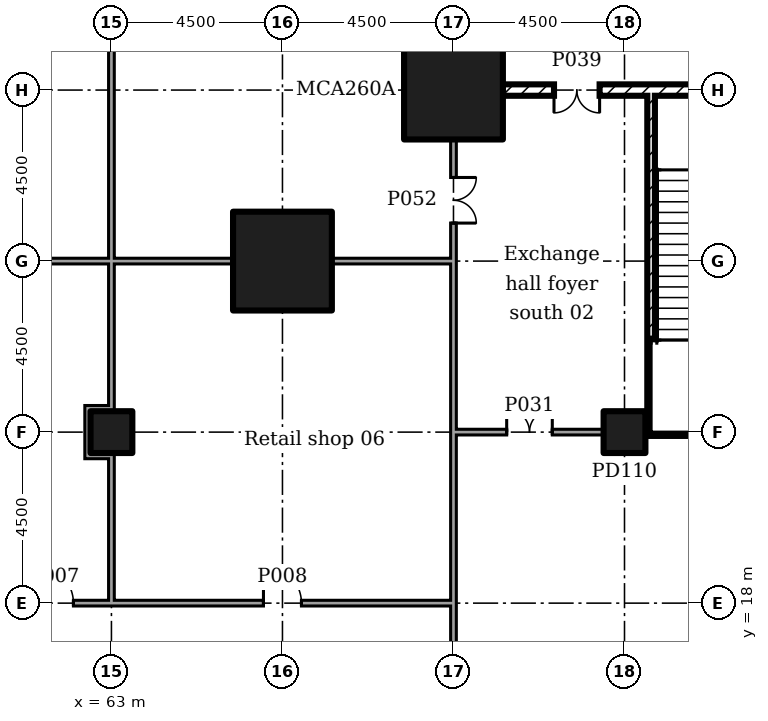
"""IFC4 building model, lengths in metres.
Left out: names, types, materials, properties, quantities, classifications, styles, units other than length and angle.
Written with IfcOpenShell. Run it as: python <this file> out.ifc"""

import sys

from ifc_helpers import new_model, si_unit, direction, frame, frame_2d, origin, origin_2d, place, context, subcontext, project, spatial, rectangle, extrude, element, fill, save


model = new_model("IFC4")
c1 = context("Model", 3, precision=1e-05, world=origin(), true_north=direction((0.0, 1.0)))
c2 = subcontext(c1, "Body", "Model", "MODEL_VIEW")
j1 = project(units=[si_unit("LENGTHUNIT", "METRE"), si_unit("PLANEANGLEUNIT", "RADIAN")], contexts=[c1])
p1 = place(None, origin())
s1 = spatial("IfcSite", under=j1, at=p1, CompositionType="ELEMENT")
p2 = place(p1, origin())
s2 = spatial("IfcBuilding", under=s1, at=p2, CompositionType="ELEMENT")
p3 = place(p2, frame((0.0, 0.0, 6.0)))
s3 = spatial("IfcBuildingStorey", under=s2, at=p3, CompositionType="ELEMENT", Elevation=6.0)
for number, where in (
    (1, (67.5, 27.0, 0.0)),
    (2, (72.0, 31.5, 0.0)),
):
    element("IfcColumn", number, at=place(p3, frame(where)), inside=s3, PredefinedType="COLUMN", context=c2, shape_type="SweptSolid", body=[
        extrude(rectangle(XDim=2.6, YDim=2.6, at=origin_2d()), origin(), (0.0, 0.0, 1.0), 5.5),
    ])
for number, where in (
    (3, (63.0, 22.5, 0.0)),
    (4, (76.5, 22.5, 0.0)),
):
    element("IfcColumn", number, at=place(p3, frame(where)), inside=s3, PredefinedType="COLUMN", context=c2, shape_type="SweptSolid", body=[
        extrude(rectangle(XDim=1.1, YDim=1.1, at=origin_2d()), origin(), (0.0, 0.0, 1.0), 5.5),
    ])
p4 = place(p3, frame((72.0, 9.3, 0.0), z_axis=(0.0, 0.0, 1.0), x_axis=(0.0, 1.0, 0.0)))
e5 = element("IfcWall", 5, at=p4, inside=s3, PredefinedType="PARTITIONING", context=c2, shape_type="SweptSolid", body=[
    extrude(rectangle(XDim=8.775, YDim=0.15, at=frame_2d((4.387, 0.0))), origin(), (0.0, 0.0, 1.0), 5.05),
])
p5 = place(p4, frame((3.45, 0.0, 0.0)))
e6 = element("IfcOpeningElement", 6, at=p5, cuts=e5, PredefinedType="OPENING", context=c2, shape_type="SweptSolid", body=[
    extrude(rectangle(XDim=1.8, YDim=2.1, at=frame_2d((0.9, 1.05))), frame((0.0, 0.085, 0.0), z_axis=(0.0, -1.0, 0.0), x_axis=(1.0, 0.0, 0.0)), (0.0, 0.0, 1.0), 0.17),
])
p6 = place(p3, frame((72.0, 18.0, 0.0), z_axis=(0.0, 0.0, 1.0), x_axis=(0.0, 1.0, 0.0)))
e7 = element("IfcWall", 7, at=p6, inside=s3, PredefinedType="PARTITIONING", context=c2, shape_type="SweptSolid", body=[
    extrude(rectangle(XDim=4.575, YDim=0.15, at=frame_2d((2.288, 0.0))), origin(), (0.0, 0.0, 1.0), 5.05),
])
p7 = place(p3, frame((72.075, 22.5, 0.0)))
e8 = element("IfcWall", 8, at=p7, inside=s3, PredefinedType="PARTITIONING", context=c2, shape_type="SweptSolid", body=[
    extrude(rectangle(XDim=3.88, YDim=0.15, at=frame_2d((1.94, 0.0))), origin(), (0.0, 0.0, 1.0), 5.05),
])
p8 = place(p7, frame((1.325, 0.0, 0.0)))
e9 = element("IfcOpeningElement", 9, at=p8, cuts=e8, PredefinedType="OPENING", context=c2, shape_type="SweptSolid", body=[
    extrude(rectangle(XDim=1.2, YDim=2.1, at=frame_2d((0.6, 1.05))), frame((0.0, 0.085, 0.0), z_axis=(0.0, -1.0, 0.0), x_axis=(1.0, 0.0, 0.0)), (0.0, 0.0, 1.0), 0.17),
])
p9 = place(p3, frame((77.1, 22.5, 0.0)))
e10 = element("IfcWall", 10, at=p9, inside=s3, PredefinedType="SOLIDWALL", context=c2, shape_type="SweptSolid", body=[
    extrude(rectangle(XDim=4.6, YDim=0.2, at=frame_2d((2.3, 0.0))), origin(), (0.0, 0.0, 1.0), 5.05),
])
p10 = place(p3, frame((73.295, 31.5, 0.0)))
e11 = element("IfcWall", 11, at=p10, inside=s3, PredefinedType="SOLIDWALL", context=c2, shape_type="SweptSolid", body=[
    extrude(rectangle(XDim=4.005, YDim=0.3, at=frame_2d((2.002, 0.0))), origin(), (0.0, 0.0, 1.0), 5.5),
])
p11 = place(p10, frame((1.35, 0.0, 0.0)))
e12 = element("IfcOpeningElement", 12, at=p11, cuts=e11, PredefinedType="OPENING", context=c2, shape_type="SweptSolid", body=[
    extrude(rectangle(XDim=1.2, YDim=2.1, at=frame_2d((0.6, 1.05))), frame((0.0, 0.16, 0.0), z_axis=(0.0, -1.0, 0.0), x_axis=(1.0, 0.0, 0.0)), (0.0, 0.0, 1.0), 0.32),
])
p12 = place(p3, frame((77.2, 31.5, 0.0)))
e13 = element("IfcWall", 13, at=p12, inside=s3, PredefinedType="SOLIDWALL", context=c2, shape_type="SweptSolid", body=[
    extrude(rectangle(XDim=4.5, YDim=0.3, at=frame_2d((2.25, 0.0))), origin(), (0.0, 0.0, 1.0), 5.5),
])
p13 = place(p3, frame((60.0, 18.0, 0.0)))
e14 = element("IfcWall", 14, at=p13, inside=s3, PredefinedType="PARTITIONING", context=c2, shape_type="SweptSolid", body=[
    extrude(rectangle(XDim=3.075, YDim=0.15, at=frame_2d((1.538, 0.0))), origin(), (0.0, 0.0, 1.0), 5.05),
])
p14 = place(p13, frame((1.0, 0.0, 0.0)))
e15 = element("IfcOpeningElement", 15, at=p14, cuts=e14, PredefinedType="OPENING", context=c2, shape_type="SweptSolid", body=[
    extrude(rectangle(XDim=1.0, YDim=2.1, at=frame_2d((0.5, 1.05))), frame((0.0, 0.085, 0.0), z_axis=(0.0, -1.0, 0.0), x_axis=(1.0, 0.0, 0.0)), (0.0, 0.0, 1.0), 0.17),
])
p15 = place(p3, frame((63.0, 18.0, 0.0)))
e16 = element("IfcWall", 16, at=p15, inside=s3, PredefinedType="PARTITIONING", context=c2, shape_type="SweptSolid", body=[
    extrude(rectangle(XDim=8.925, YDim=0.15, at=frame_2d((4.462, 0.0))), origin(), (0.0, 0.0, 1.0), 5.05),
])
p16 = place(p15, frame((4.0, 0.0, 0.0)))
e17 = element("IfcOpeningElement", 17, at=p16, cuts=e16, PredefinedType="OPENING", context=c2, shape_type="SweptSolid", body=[
    extrude(rectangle(XDim=1.0, YDim=2.1, at=frame_2d((0.5, 1.05))), frame((0.0, 0.085, 0.0), z_axis=(0.0, -1.0, 0.0), x_axis=(1.0, 0.0, 0.0)), (0.0, 0.0, 1.0), 0.17),
])
p17 = place(p3, frame((62.375, 21.8, 0.0), z_axis=(0.0, 0.0, 1.0), x_axis=(0.0, 1.0, 0.0)))
e18 = element("IfcWall", 18, at=p17, inside=s3, PredefinedType="PARTITIONING", context=c2, shape_type="SweptSolid", body=[
    extrude(rectangle(XDim=1.4, YDim=0.15, at=frame_2d((0.7, 0.0))), origin(), (0.0, 0.0, 1.0), 5.05),
])
p18 = place(p3, frame((63.0, 18.075, 0.0), z_axis=(0.0, 0.0, 1.0), x_axis=(0.0, 1.0, 0.0)))
e19 = element("IfcWall", 19, at=p18, inside=s3, PredefinedType="PARTITIONING", context=c2, shape_type="SweptSolid", body=[
    extrude(rectangle(XDim=3.875, YDim=0.15, at=frame_2d((1.938, 0.0))), origin(), (0.0, 0.0, 1.0), 5.05),
])
p19 = place(p3, frame((63.0, 23.05, 0.0), z_axis=(0.0, 0.0, 1.0), x_axis=(0.0, 1.0, 0.0)))
e20 = element("IfcWall", 20, at=p19, inside=s3, PredefinedType="PARTITIONING", context=c2, shape_type="SweptSolid", body=[
    extrude(rectangle(XDim=4.025, YDim=0.15, at=frame_2d((2.012, 0.0))), origin(), (0.0, 0.0, 1.0), 5.05),
])
for number, where in (
    (21, (62.45, 21.875, 0.0)),
    (22, (62.45, 23.125, 0.0)),
):
    element("IfcWall", number, at=place(p3, frame(where)), inside=s3, PredefinedType="PARTITIONING", context=c2, shape_type="SweptSolid", body=[
        extrude(rectangle(XDim=0.475, YDim=0.15, at=frame_2d((0.238, 0.0))), origin(), (0.0, 0.0, 1.0), 5.05),
    ])
p20 = place(p3, frame((60.075, 27.0, 0.0)))
e23 = element("IfcWall", 23, at=p20, inside=s3, PredefinedType="PARTITIONING", context=c2, shape_type="SweptSolid", body=[
    extrude(rectangle(XDim=3.0, YDim=0.15, at=frame_2d((1.5, 0.0))), origin(), (0.0, 0.0, 1.0), 5.05),
])
p21 = place(p3, frame((63.075, 27.0, 0.0)))
e24 = element("IfcWall", 24, at=p21, inside=s3, PredefinedType="PARTITIONING", context=c2, shape_type="SweptSolid", body=[
    extrude(rectangle(XDim=3.13, YDim=0.15, at=frame_2d((1.565, 0.0))), origin(), (0.0, 0.0, 1.0), 5.05),
])
p22 = place(p3, frame((68.795, 27.0, 0.0)))
e25 = element("IfcWall", 25, at=p22, inside=s3, PredefinedType="PARTITIONING", context=c2, shape_type="SweptSolid", body=[
    extrude(rectangle(XDim=3.28, YDim=0.15, at=frame_2d((1.64, 0.0))), origin(), (0.0, 0.0, 1.0), 5.05),
])
p23 = place(p3, frame((72.0, 22.5, 0.0), z_axis=(0.0, 0.0, 1.0), x_axis=(0.0, 1.0, 0.0)))
e26 = element("IfcWall", 26, at=p23, inside=s3, PredefinedType="PARTITIONING", context=c2, shape_type="SweptSolid", body=[
    extrude(rectangle(XDim=4.425, YDim=0.15, at=frame_2d((2.212, 0.0))), origin(), (0.0, 0.0, 1.0), 5.05),
])
p24 = place(p3, frame((63.0, 27.075, 0.0), z_axis=(0.0, 0.0, 1.0), x_axis=(0.0, 1.0, 0.0)))
e27 = element("IfcWall", 27, at=p24, inside=s3, PredefinedType="PARTITIONING", context=c2, shape_type="SweptSolid", body=[
    extrude(rectangle(XDim=9.0, YDim=0.15, at=frame_2d((4.5, 0.0))), origin(), (0.0, 0.0, 1.0), 5.05),
])
p25 = place(p3, frame((72.0, 27.0, 0.0), z_axis=(0.0, 0.0, 1.0), x_axis=(0.0, 1.0, 0.0)))
e28 = element("IfcWall", 28, at=p25, inside=s3, PredefinedType="PARTITIONING", context=c2, shape_type="SweptSolid", body=[
    extrude(rectangle(XDim=3.205, YDim=0.15, at=frame_2d((1.603, 0.0))), origin(), (0.0, 0.0, 1.0), 5.05),
])
p26 = place(p25, frame((1.0, 0.0, 0.0)))
e29 = element("IfcOpeningElement", 29, at=p26, cuts=e28, PredefinedType="OPENING", context=c2, shape_type="SweptSolid", body=[
    extrude(rectangle(XDim=1.2, YDim=2.1, at=frame_2d((0.6, 1.05))), frame((0.0, 0.085, 0.0), z_axis=(0.0, -1.0, 0.0), x_axis=(1.0, 0.0, 0.0)), (0.0, 0.0, 1.0), 0.17),
])
p27 = place(p3, frame((77.2, 22.6, 0.0), z_axis=(0.0, 0.0, 1.0), x_axis=(0.0, 1.0, 0.0)))
e30 = element("IfcWall", 30, at=p27, inside=s3, PredefinedType="SOLIDWALL", context=c2, shape_type="SweptSolid", body=[
    extrude(rectangle(XDim=8.75, YDim=0.2, at=frame_2d((4.375, 0.0))), origin(), (0.0, 0.0, 1.0), 5.05),
])
for number, where, z_axis, x_axis in (
    (31, (81.6, 24.54, -3.0), (0.0, 0.0, 1.0), (-1.0, 0.0, 0.0)),
    (32, (81.6, 23.2, -3.0), (0.0, 0.0, 1.0), (-1.0, 0.0, 0.0)),
):
    element("IfcWall", number, at=place(p3, frame(where, z_axis=z_axis, x_axis=x_axis)), inside=s3, PredefinedType="SOLIDWALL", context=c2, shape_type="SweptSolid", body=[
        extrude(rectangle(XDim=4.3, YDim=0.2, at=frame_2d((2.15, 0.0))), origin(), (0.0, 0.0, 1.0), 5.55),
    ])
p28 = place(p14, origin())
e33 = element("IfcDoor", 33, at=p28, inside=s3, OperationType="SINGLE_SWING_RIGHT", PredefinedType="DOOR", context=c2, shape_type="SweptSolid", body=[
    extrude(rectangle(XDim=1.0, YDim=2.1, at=frame_2d((0.5, 1.05))), frame((0.0, 0.025, 0.0), z_axis=(0.0, -1.0, 0.0), x_axis=(1.0, 0.0, 0.0)), (0.0, 0.0, 1.0), 0.05),
])
fill(e15, e33)
p29 = place(p16, origin())
e34 = element("IfcDoor", 34, at=p29, inside=s3, OperationType="SINGLE_SWING_RIGHT", PredefinedType="DOOR", context=c2, shape_type="SweptSolid", body=[
    extrude(rectangle(XDim=1.0, YDim=2.1, at=frame_2d((0.5, 1.05))), frame((0.0, 0.025, 0.0), z_axis=(0.0, -1.0, 0.0), x_axis=(1.0, 0.0, 0.0)), (0.0, 0.0, 1.0), 0.05),
])
fill(e17, e34)
p30 = place(p8, origin())
e35 = element("IfcDoor", 35, at=p30, inside=s3, OperationType="DOUBLE_DOOR_SINGLE_SWING", PredefinedType="DOOR", context=c2, shape_type="SweptSolid", body=[
    extrude(rectangle(XDim=1.2, YDim=2.1, at=frame_2d((0.6, 1.05))), frame((0.0, 0.025, 0.0), z_axis=(0.0, -1.0, 0.0), x_axis=(1.0, 0.0, 0.0)), (0.0, 0.0, 1.0), 0.05),
])
fill(e9, e35)
p31 = place(p11, frame((1.2, 0.0, 0.0), x_axis=(-1.0, 0.0, 0.0)))
e36 = element("IfcDoor", 36, at=p31, inside=s3, OperationType="DOUBLE_DOOR_SINGLE_SWING", PredefinedType="DOOR", context=c2, shape_type="SweptSolid", body=[
    extrude(rectangle(XDim=1.2, YDim=2.1, at=frame_2d((0.6, 1.05))), frame((0.0, 0.025, 0.0), z_axis=(0.0, -1.0, 0.0), x_axis=(1.0, 0.0, 0.0)), (0.0, 0.0, 1.0), 0.05),
])
fill(e12, e36)
p32 = place(p26, frame((1.2, 0.0, 0.0), x_axis=(-1.0, 0.0, 0.0)))
e37 = element("IfcDoor", 37, at=p32, inside=s3, OperationType="DOUBLE_DOOR_SINGLE_SWING", PredefinedType="DOOR", context=c2, shape_type="SweptSolid", body=[
    extrude(rectangle(XDim=1.2, YDim=2.1, at=frame_2d((0.6, 1.05))), frame((0.0, 0.025, 0.0), z_axis=(0.0, -1.0, 0.0), x_axis=(1.0, 0.0, 0.0)), (0.0, 0.0, 1.0), 0.05),
])
fill(e29, e37)
save(model, sys.argv[1])
